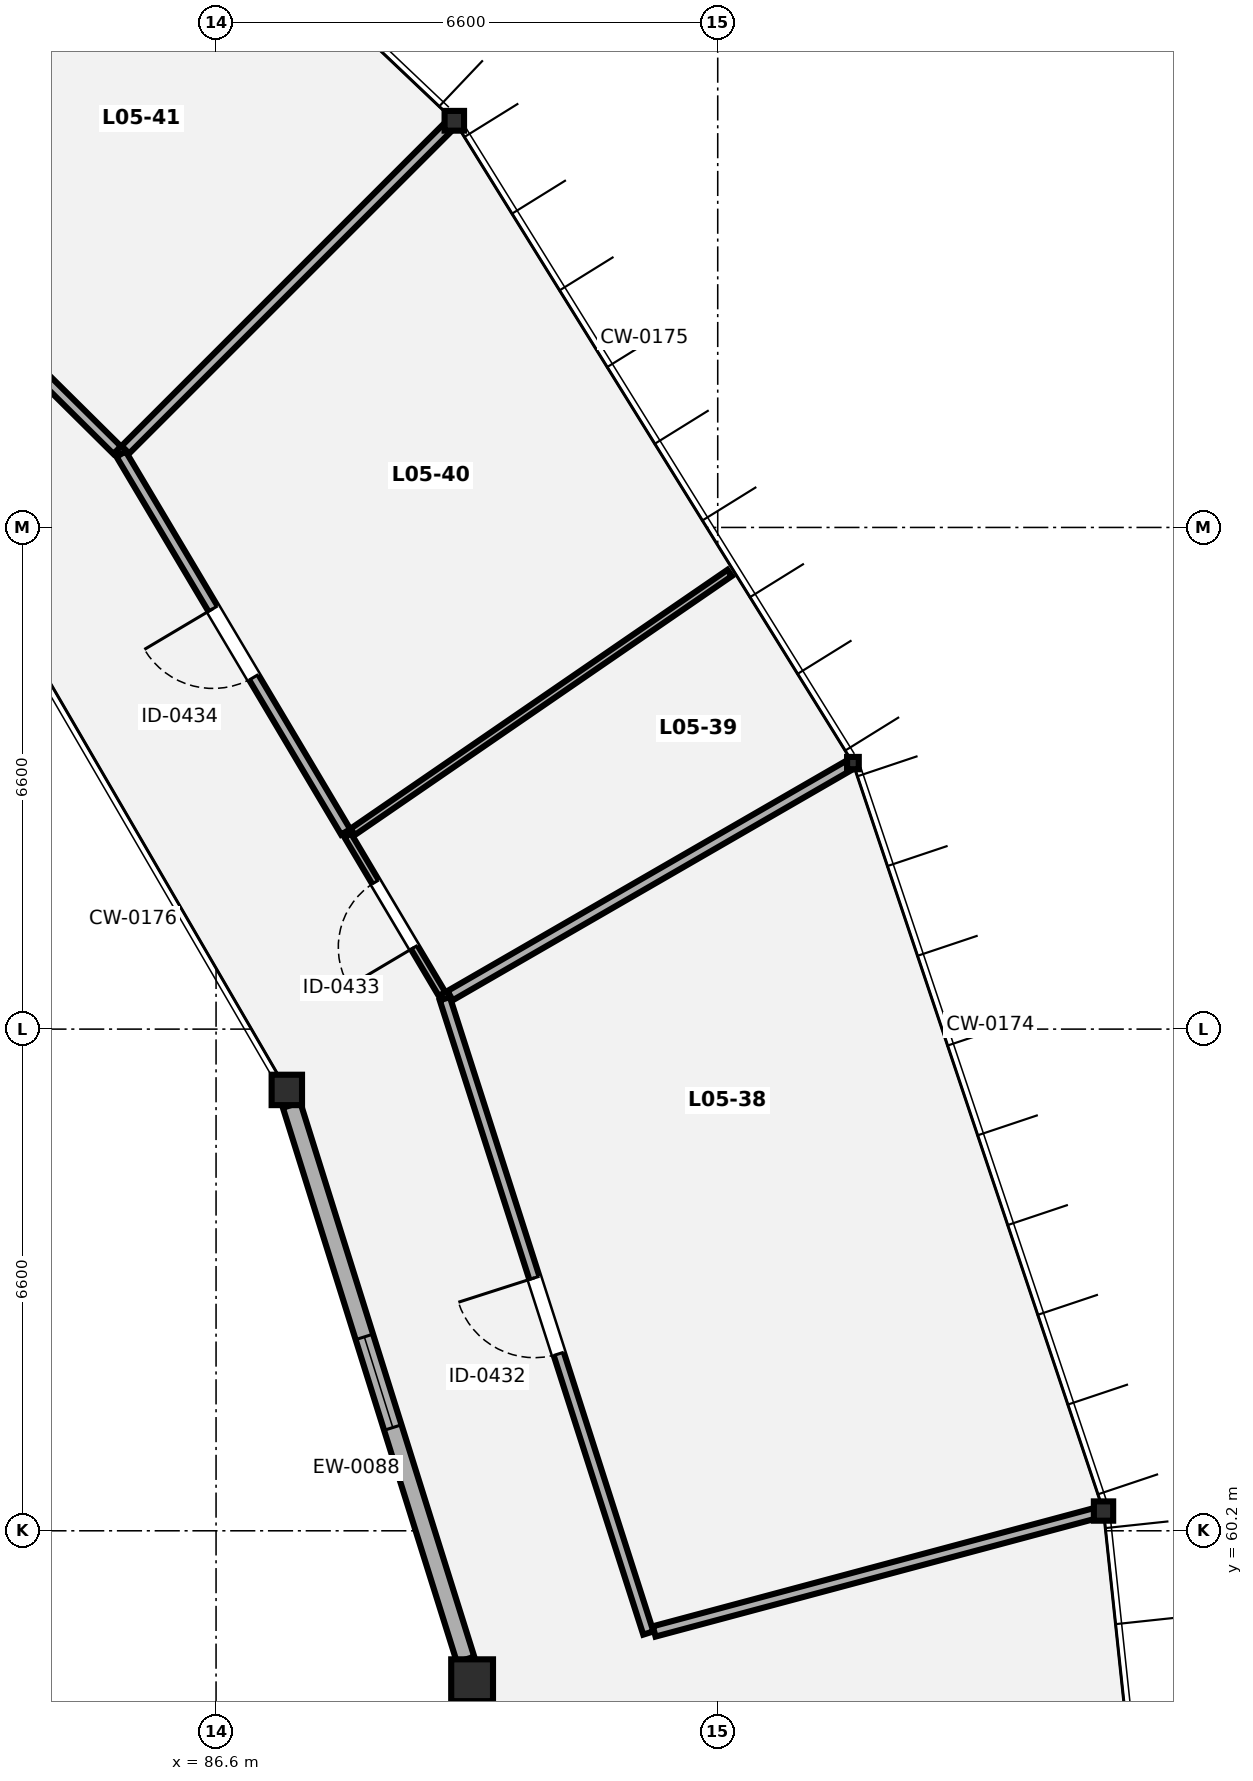
"""IFC4 building model, lengths in metres.
Left out: names, types, materials, properties, quantities, classifications, styles, units other than length and angle.
Written with IfcOpenShell. Run it as: python <this file> out.ifc"""

import sys

from ifc_helpers import new_model, si_unit, direction, frame, frame_2d, origin, origin_2d, place, context, subcontext, project, spatial, rectangle, i_section, extrude, element, fill, save


model = new_model("IFC4")
c1 = context("Model", 3, precision=1e-05, world=origin(), true_north=direction((0.0, 1.0)))
c2 = subcontext(c1, "Body", "Model", "MODEL_VIEW")
j1 = project(units=[si_unit("LENGTHUNIT", "METRE"), si_unit("PLANEANGLEUNIT", "RADIAN")], contexts=[c1])
p1 = place(None, origin())
s1 = spatial("IfcSite", under=j1, at=p1, CompositionType="ELEMENT")
p2 = place(p1, origin())
s2 = spatial("IfcBuilding", under=s1, at=p2, CompositionType="ELEMENT")
p3 = place(p2, frame((0.0, 0.0, 21.7)))
s3 = spatial("IfcBuildingStorey", under=s2, at=p3, CompositionType="ELEMENT", Elevation=21.7)
p4 = place(p3, frame((98.276, 60.46, 0.0), z_axis=(0.0, 0.0, 1.0), x_axis=(1.0, 0.0, 0.0)))
e1 = element("IfcColumn", 1, at=p4, inside=s3, PredefinedType="COLUMN", context=c2, shape_type="SweptSolid", body=[
    extrude(i_section(OverallWidth=0.254, OverallDepth=0.254, WebThickness=0.009, FlangeThickness=0.014, FilletRadius=0.014, at=origin_2d()), origin(), (0.0, 0.0, 1.0), 4.2),
])
p5 = place(p3, frame((89.969, 58.234, 0.0), z_axis=(0.0, 0.0, 1.0), x_axis=(1.0, 0.0, 0.0)))
e2 = element("IfcColumn", 2, at=p5, inside=s3, PredefinedType="COLUMN", context=c2, shape_type="SweptSolid", body=[
    extrude(rectangle(XDim=0.55, YDim=0.55, at=origin_2d()), origin(), (0.0, 0.0, 1.0), 4.2),
])
p6 = place(p3, frame((94.979, 70.3, 0.0), z_axis=(0.0, 0.0, 1.0), x_axis=(1.0, 0.0, 0.0)))
e3 = element("IfcColumn", 3, at=p6, inside=s3, PredefinedType="COLUMN", context=c2, shape_type="SweptSolid", body=[
    extrude(i_section(OverallWidth=0.154, OverallDepth=0.162, WebThickness=0.008, FlangeThickness=0.011, FilletRadius=0.009, at=origin_2d()), origin(), (0.0, 0.0, 1.0), 4.2),
])
p7 = place(p3, frame((87.531, 66.0, 0.0), z_axis=(0.0, 0.0, 1.0), x_axis=(1.0, 0.0, 0.0)))
e4 = element("IfcColumn", 4, at=p7, inside=s3, PredefinedType="PILASTER", context=c2, shape_type="SweptSolid", body=[
    extrude(rectangle(XDim=0.4, YDim=0.4, at=origin_2d()), origin(), (0.0, 0.0, 1.0), 4.2),
])
p8 = place(p3, frame((89.735, 78.75, 0.0), z_axis=(0.0, 0.0, 1.0), x_axis=(1.0, 0.0, 0.0)))
e5 = element("IfcColumn", 5, at=p8, inside=s3, PredefinedType="COLUMN", context=c2, shape_type="SweptSolid", body=[
    extrude(i_section(OverallWidth=0.256, OverallDepth=0.26, WebThickness=0.01, FlangeThickness=0.017, FilletRadius=0.014, at=origin_2d()), origin(), (0.0, 0.0, 1.0), 4.2),
])
p9 = place(p3, frame((89.883, 58.507, 0.0), z_axis=(0.0, 0.0, 1.0), x_axis=(-0.299452933333, 0.954111073575, 0.0)))
e6 = element("IfcWall", 6, at=p9, inside=s3, PredefinedType="SOLIDWALL", context=c2, shape_type="SweptSolid", body=[
    extrude(rectangle(XDim=7.646, YDim=0.24, at=frame_2d((3.823, 0.0))), origin(), (0.0, 0.0, 1.0), 3.65),
])
p10 = place(p9, frame((3.198, 0.0, 0.85)))
e7 = element("IfcOpeningElement", 7, at=p10, cuts=e6, PredefinedType="OPENING", context=c2, shape_type="SweptSolid", body=[
    extrude(rectangle(XDim=1.25, YDim=1.4, at=frame_2d((0.625, 0.7))), frame((0.0, 0.13, 0.0), z_axis=(0.0, -1.0, 0.0), x_axis=(1.0, 0.0, 0.0)), (0.0, 0.0, 1.0), 0.26),
])
p11 = place(p3, frame((92.287, 58.855, 0.0), z_axis=(0.0, 0.0, 1.0), x_axis=(-0.30548522006, 0.952196818061, 0.0)))
e8 = element("IfcWall", 8, at=p11, inside=s3, PredefinedType="PARTITIONING", context=c2, shape_type="SweptSolid", body=[
    extrude(rectangle(XDim=8.764, YDim=0.14, at=frame_2d((4.382, 0.0))), origin(), (0.0, 0.0, 1.0), 3.98),
])
p12 = place(p11, frame((3.857, 0.0, 0.0)))
e9 = element("IfcOpeningElement", 9, at=p12, cuts=e8, PredefinedType="OPENING", context=c2, shape_type="SweptSolid", body=[
    extrude(rectangle(XDim=1.05, YDim=2.15, at=frame_2d((0.525, 1.075))), frame((0.0, 0.08, 0.0), z_axis=(0.0, -1.0, 0.0), x_axis=(1.0, 0.0, 0.0)), (0.0, 0.0, 1.0), 0.16),
])
p13 = place(p3, frame((92.364, 58.876, 0.0), z_axis=(0.0, 0.0, 1.0), x_axis=(0.96591927772, 0.258843483457, 0.0)))
e10 = element("IfcWall", 10, at=p13, inside=s3, PredefinedType="PARTITIONING", context=c2, shape_type="SweptSolid", body=[
    extrude(rectangle(XDim=6.06, YDim=0.14, at=frame_2d((3.03, 0.0))), origin(), (0.0, 0.0, 1.0), 3.323),
])
p14 = place(p3, frame((89.679, 67.24, 0.0), z_axis=(0.0, 0.0, 1.0), x_axis=(0.866020543329, 0.500008418462, 0.0)))
e11 = element("IfcWall", 11, at=p14, inside=s3, PredefinedType="PARTITIONING", context=c2, shape_type="SweptSolid", body=[
    extrude(rectangle(XDim=6.06, YDim=0.14, at=frame_2d((3.03, 0.0))), origin(), (0.0, 0.0, 1.0), 3.471),
])
p15 = place(p3, frame((89.573, 67.262, 0.0), z_axis=(0.0, 0.0, 1.0), x_axis=(-0.510928867953, 0.859622994046, 0.0)))
e12 = element("IfcWall", 12, at=p15, inside=s3, PredefinedType="PARTITIONING", context=c2, shape_type="SweptSolid", body=[
    extrude(rectangle(XDim=2.429, YDim=0.1, at=frame_2d((1.214, 0.0))), origin(), (0.0, 0.0, 1.0), 3.98),
])
p16 = place(p15, frame((0.714, 0.0, 0.0)))
e13 = element("IfcOpeningElement", 13, at=p16, cuts=e12, PredefinedType="OPENING", context=c2, shape_type="SweptSolid", body=[
    extrude(rectangle(XDim=1.0, YDim=2.1, at=frame_2d((0.5, 1.05))), frame((0.0, 0.06, 0.0), z_axis=(0.0, -1.0, 0.0), x_axis=(1.0, 0.0, 0.0)), (0.0, 0.0, 1.0), 0.12),
])
p17 = place(p3, frame((88.398, 69.395, 0.0), z_axis=(0.0, 0.0, 1.0), x_axis=(0.824271584206, 0.566194626847, 0.0)))
e14 = element("IfcWall", 14, at=p17, inside=s3, PredefinedType="PARTITIONING", context=c2, shape_type="SweptSolid", body=[
    extrude(rectangle(XDim=6.016, YDim=0.1, at=frame_2d((3.008, 0.0))), origin(), (0.0, 0.0, 1.0), 3.98),
])
p18 = place(p3, frame((88.305, 69.395, 0.0), z_axis=(0.0, 0.0, 1.0), x_axis=(-0.510896676259, 0.859642126811, 0.0)))
e15 = element("IfcWall", 15, at=p18, inside=s3, PredefinedType="PARTITIONING", context=c2, shape_type="SweptSolid", body=[
    extrude(rectangle(XDim=5.783, YDim=0.14, at=frame_2d((2.892, 0.0))), origin(), (0.0, 0.0, 1.0), 3.98),
])
p19 = place(p18, frame((2.366, 0.0, 0.0)))
e16 = element("IfcOpeningElement", 16, at=p19, cuts=e15, PredefinedType="OPENING", context=c2, shape_type="SweptSolid", body=[
    extrude(rectangle(XDim=1.05, YDim=2.15, at=frame_2d((0.525, 1.075))), frame((0.0, 0.08, 0.0), z_axis=(0.0, -1.0, 0.0), x_axis=(1.0, 0.0, 0.0)), (0.0, 0.0, 1.0), 0.16),
])
p20 = place(p3, frame((85.407, 74.423, 0.0), z_axis=(0.0, 0.0, 1.0), x_axis=(0.70712692467, 0.707086637129, 0.0)))
e17 = element("IfcWall", 17, at=p20, inside=s3, PredefinedType="PARTITIONING", context=c2, shape_type="SweptSolid", body=[
    extrude(rectangle(XDim=6.06, YDim=0.14, at=frame_2d((3.03, 0.0))), origin(), (0.0, 0.0, 1.0), 3.465),
])
p21 = place(p3, frame((85.299, 74.417, 0.0), z_axis=(0.0, 0.0, 1.0), x_axis=(-0.710410596589, 0.703787456732, 0.0)))
e18 = element("IfcWall", 18, at=p21, inside=s3, PredefinedType="PARTITIONING", context=c2, shape_type="SweptSolid", body=[
    extrude(rectangle(XDim=7.741, YDim=0.14, at=frame_2d((3.871, 0.0))), origin(), (0.0, 0.0, 1.0), 3.98),
])
p22 = place(p21, frame((3.121, 0.0, 0.0)))
e19 = element("IfcOpeningElement", 19, at=p22, cuts=e18, PredefinedType="OPENING", context=c2, shape_type="SweptSolid", body=[
    extrude(rectangle(XDim=1.5, YDim=2.15, at=frame_2d((0.75, 1.075))), frame((0.0, 0.08, 0.0), z_axis=(0.0, -1.0, 0.0), x_axis=(1.0, 0.0, 0.0)), (0.0, 0.0, 1.0), 0.16),
])
p23 = place(p10, origin())
e20 = element("IfcWindow", 20, at=p23, inside=s3, PartitioningType="SINGLE_PANEL", PredefinedType="WINDOW", context=c2, shape_type="SweptSolid", body=[
    extrude(rectangle(XDim=1.25, YDim=1.4, at=frame_2d((0.625, 0.7))), frame((0.0, 0.03, 0.0), z_axis=(0.0, -1.0, 0.0), x_axis=(1.0, 0.0, 0.0)), (0.0, 0.0, 1.0), 0.06),
])
fill(e7, e20)
p24 = place(p12, origin())
e21 = element("IfcDoor", 21, at=p24, inside=s3, OperationType="SINGLE_SWING_RIGHT", PredefinedType="DOOR", context=c2, shape_type="SweptSolid", body=[
    extrude(rectangle(XDim=1.05, YDim=2.15, at=frame_2d((0.525, 1.075))), frame((0.0, 0.025, 0.0), z_axis=(0.0, -1.0, 0.0), x_axis=(1.0, 0.0, 0.0)), (0.0, 0.0, 1.0), 0.05),
])
fill(e9, e21)
p25 = place(p16, origin())
e22 = element("IfcDoor", 22, at=p25, inside=s3, OperationType="SINGLE_SWING_LEFT", PredefinedType="DOOR", context=c2, shape_type="SweptSolid", body=[
    extrude(rectangle(XDim=1.0, YDim=2.1, at=frame_2d((0.5, 1.05))), frame((0.0, 0.025, 0.0), z_axis=(0.0, -1.0, 0.0), x_axis=(1.0, 0.0, 0.0)), (0.0, 0.0, 1.0), 0.05),
])
fill(e13, e22)
p26 = place(p19, origin())
e23 = element("IfcDoor", 23, at=p26, inside=s3, OperationType="SINGLE_SWING_RIGHT", PredefinedType="DOOR", context=c2, shape_type="SweptSolid", body=[
    extrude(rectangle(XDim=1.05, YDim=2.15, at=frame_2d((0.525, 1.075))), frame((0.0, 0.025, 0.0), z_axis=(0.0, -1.0, 0.0), x_axis=(1.0, 0.0, 0.0)), (0.0, 0.0, 1.0), 0.05),
])
fill(e16, e23)
save(model, sys.argv[1])
